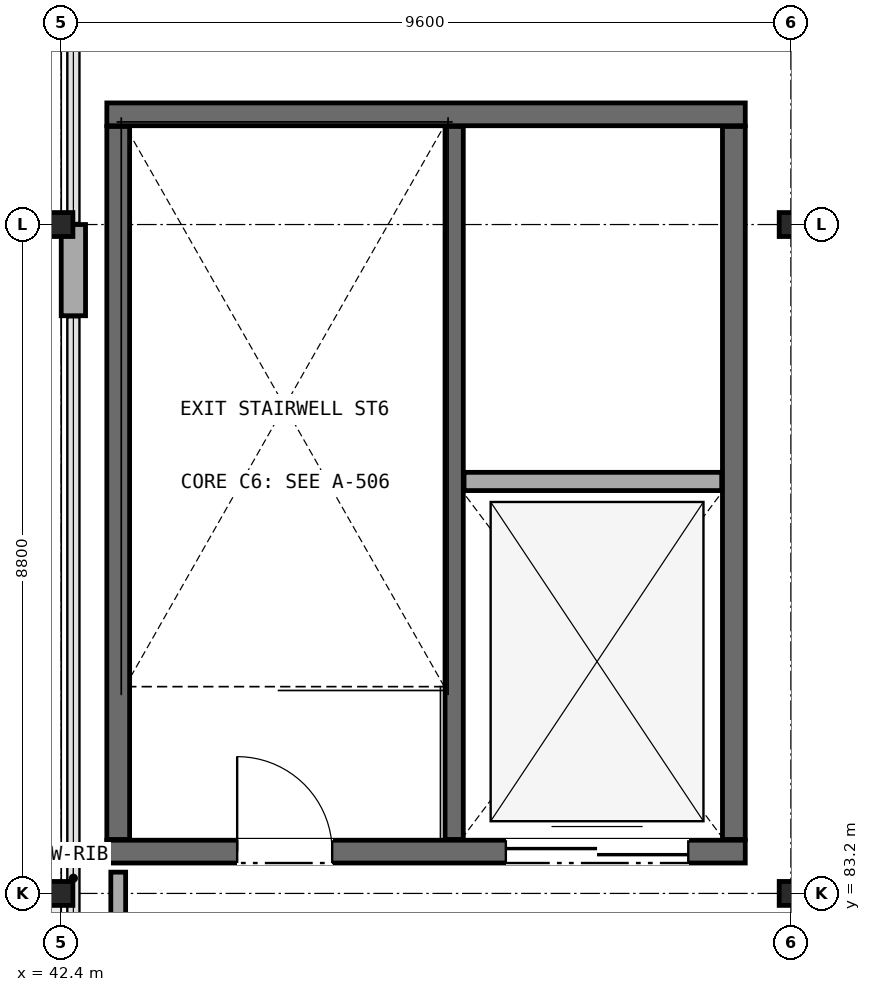
"""IFC4 building model, lengths in metres.
Left out: names, types, materials, properties, quantities, classifications, styles, units other than length and angle.
Written with IfcOpenShell. Run it as: python <this file> out.ifc"""

import sys

from ifc_helpers import new_model, si_unit, direction, frame, frame_2d, origin, origin_2d, place, context, subcontext, project, spatial, rectangle, i_section, extrude, element, fill, save


model = new_model("IFC4")
c1 = context("Model", 3, precision=1e-05, world=origin(), true_north=direction((0.0, 1.0)))
c2 = subcontext(c1, "Body", "Model", "MODEL_VIEW")
j1 = project(units=[si_unit("LENGTHUNIT", "METRE"), si_unit("PLANEANGLEUNIT", "RADIAN")], contexts=[c1])
p1 = place(None, origin())
s1 = spatial("IfcSite", under=j1, at=p1, CompositionType="ELEMENT")
p2 = place(p1, origin())
s2 = spatial("IfcBuilding", under=s1, at=p2, CompositionType="ELEMENT")
p3 = place(p2, frame((0.0, 0.0, 19.1)))
s3 = spatial("IfcBuildingStorey", under=s2, at=p3, CompositionType="ELEMENT", Elevation=19.1)
for number, where, z_axis, x_axis in (
    (1, (42.4, 83.2, 0.0), (0.0, 0.0, 1.0), (1.0, 0.0, 0.0)),
    (2, (42.4, 92.0, 0.0), (0.0, 0.0, 1.0), (1.0, 0.0, 0.0)),
    (3, (52.0, 83.2, 0.0), (0.0, 0.0, 1.0), (1.0, 0.0, 0.0)),
    (4, (52.0, 92.0, 0.0), (0.0, 0.0, 1.0), (1.0, 0.0, 0.0)),
):
    element("IfcColumn", number, at=place(p3, frame(where, z_axis=z_axis, x_axis=x_axis)), inside=s3, PredefinedType="COLUMN", context=c2, shape_type="SweptSolid", body=[
        extrude(i_section(OverallWidth=0.307, OverallDepth=0.315, WebThickness=0.012, FlangeThickness=0.019, FilletRadius=0.017, at=origin_2d()), origin(), (0.0, 0.0, 1.0), 9.0),
    ])
p4 = place(p3, frame((42.56, 92.0, 0.0), z_axis=(0.0, 0.0, 1.0), x_axis=(0.0, -1.0, 0.0)))
e5 = element("IfcWall", 5, at=p4, inside=s3, PredefinedType="STANDARD", context=c2, shape_type="SweptSolid", body=[
    extrude(rectangle(XDim=1.2, YDim=0.32, at=frame_2d((0.6, 0.0))), origin(), (0.0, 0.0, 1.0), 8.278),
])
p5 = place(p3, frame((43.0, 83.75, 0.0), z_axis=(0.0, 0.0, 1.0), x_axis=(1.0, 0.0, 0.0)))
e6 = element("IfcWall", 6, at=p5, inside=s3, PredefinedType="SHEAR", context=c2, shape_type="SweptSolid", body=[
    extrude(rectangle(XDim=8.4, YDim=0.3, at=frame_2d((4.2, 0.0))), origin(), (0.0, 0.0, 1.0), 8.745),
])
p6 = place(p5, frame((1.715, 0.0, 0.0)))
e7 = element("IfcOpeningElement", 7, at=p6, cuts=e6, PredefinedType="OPENING", context=c2, shape_type="SweptSolid", body=[
    extrude(rectangle(XDim=1.25, YDim=2.2, at=frame_2d((0.625, 1.1))), frame((0.0, 0.16, 0.0), z_axis=(0.0, -1.0, 0.0), x_axis=(1.0, 0.0, 0.0)), (0.0, 0.0, 1.0), 0.32),
])
p7 = place(p5, frame((5.25, 0.0, 0.0)))
e8 = element("IfcOpeningElement", 8, at=p7, cuts=e6, PredefinedType="OPENING", context=c2, shape_type="SweptSolid", body=[
    extrude(rectangle(XDim=2.4, YDim=2.55, at=frame_2d((1.2, 1.275))), frame((0.0, 0.16, 0.0), z_axis=(0.0, -1.0, 0.0), x_axis=(1.0, 0.0, 0.0)), (0.0, 0.0, 1.0), 0.32),
])
p8 = place(p3, frame((51.4, 93.45, 0.0), z_axis=(0.0, 0.0, 1.0), x_axis=(-1.0, 0.0, 0.0)))
e9 = element("IfcWall", 9, at=p8, inside=s3, PredefinedType="SHEAR", context=c2, shape_type="SweptSolid", body=[
    extrude(rectangle(XDim=8.4, YDim=0.3, at=frame_2d((4.2, 0.0))), origin(), (0.0, 0.0, 1.0), 8.745),
])
for number, where, z_axis, x_axis in (
    (10, (51.25, 83.91, 0.0), (0.0, 0.0, 1.0), (0.0, 1.0, 0.0)),
    (11, (43.15, 93.29, 0.0), (0.0, 0.0, 1.0), (0.0, -1.0, 0.0)),
):
    element("IfcWall", number, at=place(p3, frame(where, z_axis=z_axis, x_axis=x_axis)), inside=s3, PredefinedType="SHEAR", context=c2, shape_type="SweptSolid", body=[
        extrude(rectangle(XDim=9.38, YDim=0.3, at=frame_2d((4.69, 0.0))), origin(), (0.0, 0.0, 1.0), 8.745),
    ])
p9 = place(p3, frame((47.57, 83.91, 0.0), z_axis=(0.0, 0.0, 1.0), x_axis=(0.0, 1.0, 0.0)))
e12 = element("IfcWall", 12, at=p9, inside=s3, PredefinedType="SOLIDWALL", context=c2, shape_type="SweptSolid", body=[
    extrude(rectangle(XDim=9.38, YDim=0.24, at=frame_2d((4.69, 0.0))), origin(), (0.0, 0.0, 1.0), 8.745),
])
p10 = place(p3, frame((47.7, 88.62, 0.0), z_axis=(0.0, 0.0, 1.0), x_axis=(1.0, 0.0, 0.0)))
e13 = element("IfcWall", 13, at=p10, inside=s3, PredefinedType="SOLIDWALL", context=c2, shape_type="SweptSolid", body=[
    extrude(rectangle(XDim=3.39, YDim=0.24, at=frame_2d((1.695, 0.0))), origin(), (0.0, 0.0, 1.0), 8.745),
])
p11 = place(p3, frame((43.15, 83.48, 0.0), z_axis=(0.0, 0.0, 1.0), x_axis=(0.0, -1.0, 0.0)))
e14 = element("IfcWall", 14, at=p11, inside=s3, PredefinedType="PARTITIONING", context=c2, shape_type="SweptSolid", body=[
    extrude(rectangle(XDim=6.92, YDim=0.195, at=frame_2d((3.46, 0.0))), origin(), (0.0, 0.0, 1.0), 8.187),
])
p12 = place(p11, frame((2.48, 0.0, 0.0)))
e15 = element("IfcOpeningElement", 15, at=p12, cuts=e14, PredefinedType="OPENING", context=c2, shape_type="SweptSolid", body=[
    extrude(rectangle(XDim=1.96, YDim=2.46, at=frame_2d((0.98, 1.23))), frame((0.0, 0.107, 0.0), z_axis=(0.0, -1.0, 0.0), x_axis=(1.0, 0.0, 0.0)), (0.0, 0.0, 1.0), 0.215),
])
p13 = place(p6, origin())
e16 = element("IfcDoor", 16, at=p13, inside=s3, OperationType="SINGLE_SWING_LEFT", PredefinedType="DOOR", context=c2, shape_type="SweptSolid", body=[
    extrude(rectangle(XDim=1.25, YDim=2.2, at=frame_2d((0.625, 1.1))), frame((0.0, 0.025, 0.0), z_axis=(0.0, -1.0, 0.0), x_axis=(1.0, 0.0, 0.0)), (0.0, 0.0, 1.0), 0.05),
])
fill(e7, e16)
p14 = place(p7, origin())
e17 = element("IfcDoor", 17, at=p14, inside=s3, OperationType="DOUBLE_DOOR_SLIDING", PredefinedType="DOOR", context=c2, shape_type="SweptSolid", body=[
    extrude(rectangle(XDim=2.4, YDim=2.55, at=frame_2d((1.2, 1.275))), frame((0.0, 0.025, 0.0), z_axis=(0.0, -1.0, 0.0), x_axis=(1.0, 0.0, 0.0)), (0.0, 0.0, 1.0), 0.05),
])
fill(e8, e17)
save(model, sys.argv[1])
